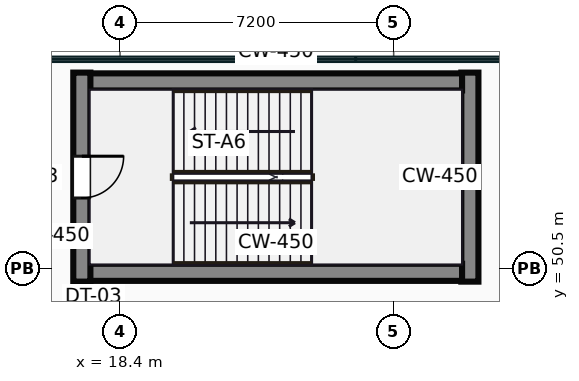
"""IFC4 building model, lengths in metres.
Left out: names, types, materials, properties, quantities, classifications, styles, units other than length and angle.
Written with IfcOpenShell. Run it as: python <this file> out.ifc"""

import sys

from ifc_helpers import new_model, si_unit, direction, frame, frame_2d, origin, place, context, subcontext, project, spatial, rectangle, extrude, source, transform, mapped, element, fill, save


model = new_model("IFC4")
c1 = context("Model", 3, precision=1e-05, world=origin(), true_north=direction((0.0, 1.0)))
c2 = subcontext(c1, "Body", "Model", "MODEL_VIEW")
j1 = project(units=[si_unit("LENGTHUNIT", "METRE"), si_unit("PLANEANGLEUNIT", "RADIAN")], contexts=[c1])
p1 = place(None, origin())
s1 = spatial("IfcSite", under=j1, at=p1, CompositionType="ELEMENT")
p2 = place(p1, origin())
s2 = spatial("IfcBuilding", under=s1, at=p2, CompositionType="ELEMENT")
p3 = place(p2, frame((0.0, 0.0, 16.0)))
s3 = spatial("IfcBuildingStorey", under=s2, at=p3, CompositionType="ELEMENT", Elevation=16.0)
m1 = source(origin(), c2, "Body", "SweptSolid", [
    extrude(rectangle(XDim=5.5, YDim=0.45, at=frame_2d((2.75, 0.0))), origin(), (0.0, 0.0, 1.0), 5.0),
])
p4 = place(p3, frame((17.395, 50.15, 0.0), z_axis=(0.0, 0.0, 1.0), x_axis=(0.0, 1.0, 0.0)))
e1 = element("IfcWall", 1, at=p4, inside=s3, PredefinedType="SHEAR", context=c2, shape_type="MappedRepresentation", body=[
    mapped(m1, transform((0.0, 0.0, 0.0))),
])
p5 = place(p4, frame((2.2, 0.0, 0.0)))
e2 = element("IfcOpeningElement", 2, at=p5, cuts=e1, PredefinedType="OPENING", context=c2, shape_type="SweptSolid", body=[
    extrude(rectangle(XDim=1.1, YDim=2.15, at=frame_2d((0.55, 1.075))), frame((0.0, 0.235, 0.0), z_axis=(0.0, -1.0, 0.0), x_axis=(1.0, 0.0, 0.0)), (0.0, 0.0, 1.0), 0.47),
])
m2 = source(origin(), c2, "Body", "SweptSolid", [
    extrude(rectangle(XDim=9.8, YDim=0.45, at=frame_2d((4.9, 0.0))), origin(), (0.0, 0.0, 1.0), 5.0),
])
for number, where, z_axis, x_axis in (
    (3, (17.6, 50.395, 0.0), (0.0, 0.0, 1.0), (1.0, 0.0, 0.0)),
    (4, (17.6, 55.405, 0.0), (0.0, 0.0, 1.0), (1.0, 0.0, 0.0)),
):
    element("IfcWall", number, at=place(p3, frame(where, z_axis=z_axis, x_axis=x_axis)), inside=s3, PredefinedType="SHEAR", context=c2, shape_type="MappedRepresentation", body=[
        mapped(m2, transform((0.0, 0.0, 0.0))),
    ])
p6 = place(p3, frame((27.605, 50.15, 0.0), z_axis=(0.0, 0.0, 1.0), x_axis=(0.0, 1.0, 0.0)))
e5 = element("IfcWall", 5, at=p6, inside=s3, PredefinedType="SHEAR", context=c2, shape_type="MappedRepresentation", body=[
    mapped(m1, transform((0.0, 0.0, 0.0))),
])
m3 = source(origin(), c2, "Body", "SweptSolid", [
    extrude(rectangle(XDim=1.1, YDim=2.15, at=frame_2d((0.55, 1.075))), frame((0.0, 0.025, 0.0), z_axis=(0.0, -1.0, 0.0), x_axis=(1.0, 0.0, 0.0)), (0.0, 0.0, 1.0), 0.05),
])
p7 = place(p5, frame((1.1, 0.0, 0.0), z_axis=(0.0, 0.0, 1.0), x_axis=(-1.0, 0.0, 0.0)))
e6 = element("IfcDoor", 6, at=p7, inside=s3, OperationType="SINGLE_SWING_RIGHT", PredefinedType="DOOR", context=c2, shape_type="MappedRepresentation", body=[
    mapped(m3, transform((0.0, 0.0, 0.0))),
])
fill(e2, e6)
save(model, sys.argv[1])
